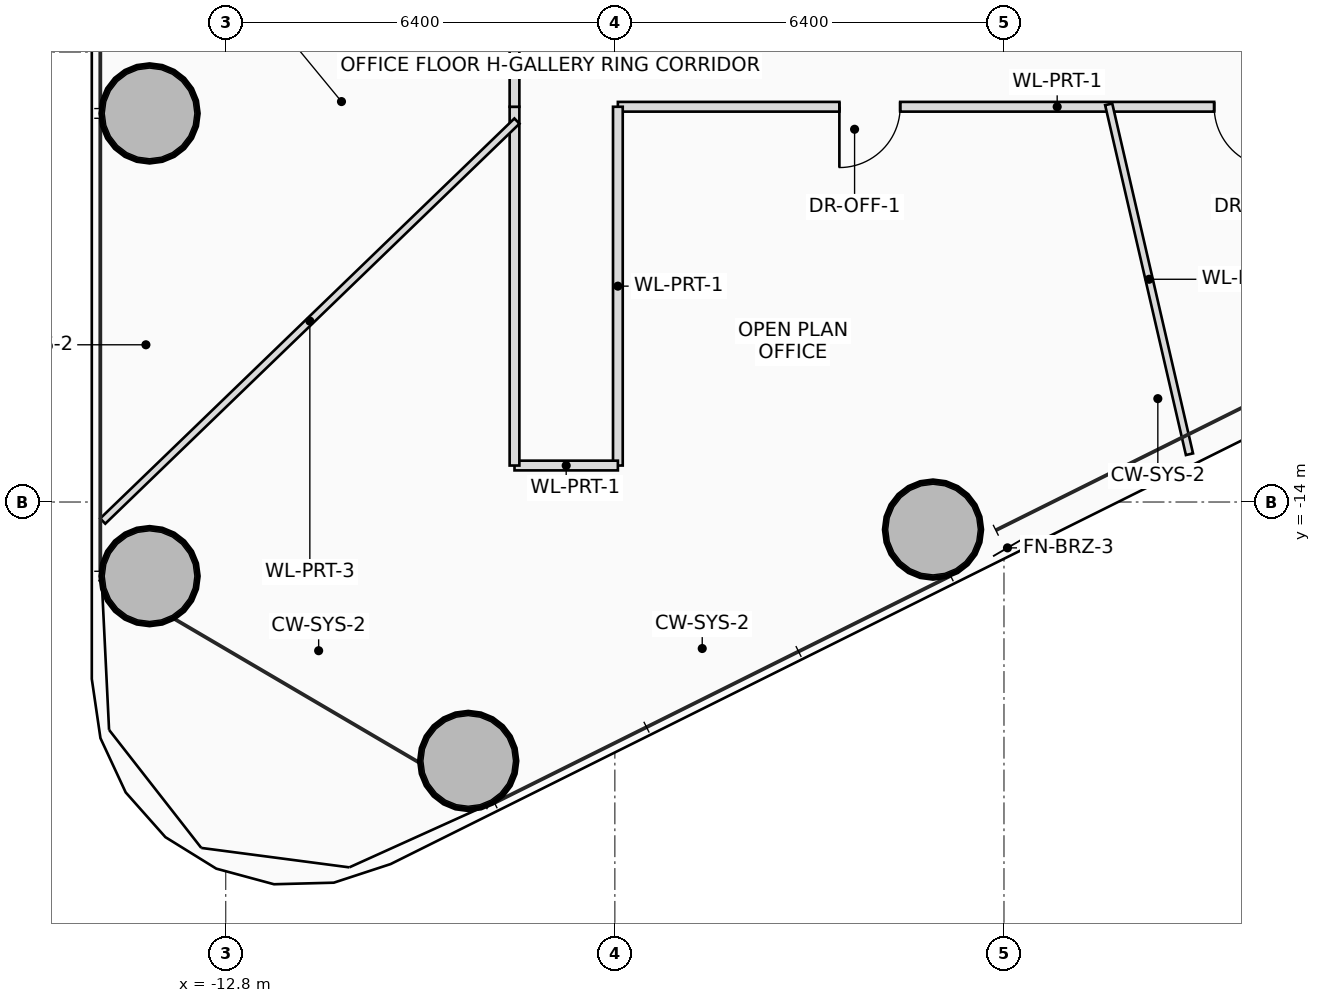
"""IFC4 building model, lengths in metres.
Left out: names, types, materials, properties, quantities, classifications, styles, units other than length and angle.
Written with IfcOpenShell. Run it as: python <this file> out.ifc"""

import sys

from ifc_helpers import new_model, si_unit, direction, frame, frame_2d, origin, origin_2d, place, context, subcontext, project, spatial, rectangle, hollow_circle, extrude, source, transform, mapped, element, fill, save


model = new_model("IFC4")
c1 = context("Model", 3, precision=1e-05, world=origin(), true_north=direction((0.0, 1.0)))
c2 = subcontext(c1, "Body", "Model", "MODEL_VIEW")
j1 = project(units=[si_unit("LENGTHUNIT", "METRE"), si_unit("PLANEANGLEUNIT", "RADIAN")], contexts=[c1])
p1 = place(None, origin())
s1 = spatial("IfcSite", under=j1, at=p1, CompositionType="ELEMENT")
p2 = place(p1, origin())
s2 = spatial("IfcBuilding", under=s1, at=p2, CompositionType="ELEMENT")
p3 = place(p2, frame((0.0, 0.0, 23.8)))
s3 = spatial("IfcBuildingStorey", under=s2, at=p3, CompositionType="ELEMENT", Elevation=23.8)
m1 = source(origin(), c2, "Body", "SweptSolid", [
    extrude(hollow_circle(Radius=0.8, WallThickness=0.055, at=origin_2d()), origin(), (0.0, 0.0, 1.0), 3.7),
])
for number, where, z_axis, x_axis in (
    (1, (-8.812, -18.258, 0.0), (0.0, 0.0, 1.0), (1.0, 0.0, 0.0)),
    (2, (-1.167, -14.453, 0.0), (0.0, 0.0, 1.0), (1.0, 0.0, 0.0)),
    (3, (-14.052, -7.61, 0.0), (0.0, 0.0, 1.0), (1.0, 0.0, 0.0)),
    (4, (-14.052, -15.219, 0.0), (0.0, 0.0, 1.0), (1.0, 0.0, 0.0)),
):
    element("IfcColumn", number, at=place(p3, frame(where, z_axis=z_axis, x_axis=x_axis)), inside=s3, PredefinedType="COLUMN", context=c2, shape_type="MappedRepresentation", body=[
        mapped(m1, transform((0.0, 0.0, 0.0), scale=1.0)),
    ])
p4 = place(p3, frame((6.35, -7.5, 0.0), z_axis=(0.0, 0.0, 1.0), x_axis=(-1.0, 0.0, 0.0)))
e5 = element("IfcWall", 5, at=p4, inside=s3, PredefinedType="PARTITIONING", context=c2, shape_type="SweptSolid", body=[
    extrude(rectangle(XDim=12.7, YDim=0.16, at=frame_2d((6.35, 0.0))), origin(), (0.0, 0.0, 1.0), 2.8),
])
p5 = place(p4, frame((1.893, 0.0, 0.0)))
e6 = element("IfcOpeningElement", 6, at=p5, cuts=e5, PredefinedType="OPENING", context=c2, shape_type="SweptSolid", body=[
    extrude(rectangle(XDim=1.0, YDim=2.25, at=frame_2d((0.5, 1.125))), frame((0.0, 0.09, 0.0), z_axis=(0.0, -1.0, 0.0), x_axis=(1.0, 0.0, 0.0)), (0.0, 0.0, 1.0), 0.18),
])
p6 = place(p4, frame((8.057, 0.0, 0.0)))
e7 = element("IfcOpeningElement", 7, at=p6, cuts=e5, PredefinedType="OPENING", context=c2, shape_type="SweptSolid", body=[
    extrude(rectangle(XDim=1.0, YDim=2.25, at=frame_2d((0.5, 1.125))), frame((0.0, 0.09, 0.0), z_axis=(0.0, -1.0, 0.0), x_axis=(1.0, 0.0, 0.0)), (0.0, 0.0, 1.0), 0.18),
])
p7 = place(p3, frame((-6.35, -7.5, 0.0), z_axis=(0.0, 0.0, 1.0), x_axis=(0.0, -1.0, 0.0)))
e8 = element("IfcWall", 8, at=p7, inside=s3, PredefinedType="PARTITIONING", context=c2, shape_type="SweptSolid", body=[
    extrude(rectangle(XDim=5.9, YDim=0.16, at=frame_2d((2.95, 0.0))), origin(), (0.0, 0.0, 1.0), 2.8),
])
p8 = place(p3, frame((-6.35, -13.4, 0.0), z_axis=(0.0, 0.0, 1.0), x_axis=(-1.0, 0.0, 0.0)))
e9 = element("IfcWall", 9, at=p8, inside=s3, PredefinedType="PARTITIONING", context=c2, shape_type="SweptSolid", body=[
    extrude(rectangle(XDim=1.7, YDim=0.16, at=frame_2d((0.85, 0.0))), origin(), (0.0, 0.0, 1.0), 2.8),
])
p9 = place(p3, frame((-8.05, -13.4, 0.0), z_axis=(0.0, 0.0, 1.0), x_axis=(0.0, 1.0, 0.0)))
e10 = element("IfcWall", 10, at=p9, inside=s3, PredefinedType="PARTITIONING", context=c2, shape_type="SweptSolid", body=[
    extrude(rectangle(XDim=5.9, YDim=0.16, at=frame_2d((2.95, 0.0))), origin(), (0.0, 0.0, 1.0), 2.8),
])
p10 = place(p3, frame((-8.05, -7.5, 0.0), z_axis=(0.0, 0.0, 1.0), x_axis=(0.0, 1.0, 0.0)))
e11 = element("IfcWall", 11, at=p10, inside=s3, PredefinedType="PARTITIONING", context=c2, shape_type="SweptSolid", body=[
    extrude(rectangle(XDim=15.0, YDim=0.16, at=frame_2d((7.5, 0.0))), origin(), (0.0, 0.0, 1.0), 2.8),
])
p11 = place(p10, frame((7.0, 0.0, 0.0)))
e12 = element("IfcOpeningElement", 12, at=p11, cuts=e11, PredefinedType="OPENING", context=c2, shape_type="SweptSolid", body=[
    extrude(rectangle(XDim=1.0, YDim=2.25, at=frame_2d((0.5, 1.125))), frame((0.0, 0.09, 0.0), z_axis=(0.0, -1.0, 0.0), x_axis=(1.0, 0.0, 0.0)), (0.0, 0.0, 1.0), 0.18),
])
p12 = place(p3, frame((-8.01, -7.735, 0.0), z_axis=(0.0, 0.0, 1.0), x_axis=(-0.719335268178, -0.694663063618, 0.0)))
e13 = element("IfcWall", 13, at=p12, inside=s3, PredefinedType="PARTITIONING", context=c2, shape_type="SweptSolid", body=[
    extrude(rectangle(XDim=9.47, YDim=0.12, at=frame_2d((4.735, 0.0))), origin(), (0.0, 0.0, 1.0), 2.8),
])
p13 = place(p3, frame((1.722, -7.46, 0.0), z_axis=(0.0, 0.0, 1.0), x_axis=(0.22494706926, -0.974370984806, 0.0)))
e14 = element("IfcWall", 14, at=p13, inside=s3, PredefinedType="PARTITIONING", context=c2, shape_type="SweptSolid", body=[
    extrude(rectangle(XDim=5.905, YDim=0.12, at=frame_2d((2.953, 0.0))), origin(), (0.0, 0.0, 1.0), 2.96),
])
p14 = place(p5, origin())
e15 = element("IfcDoor", 15, at=p14, inside=s3, OperationType="SINGLE_SWING_LEFT", PredefinedType="DOOR", context=c2, shape_type="SweptSolid", body=[
    extrude(rectangle(XDim=1.0, YDim=2.25, at=frame_2d((0.5, 1.125))), frame((0.0, 0.025, 0.0), z_axis=(0.0, -1.0, 0.0), x_axis=(1.0, 0.0, 0.0)), (0.0, 0.0, 1.0), 0.05),
])
fill(e6, e15)
p15 = place(p6, origin())
e16 = element("IfcDoor", 16, at=p15, inside=s3, OperationType="SINGLE_SWING_RIGHT", PredefinedType="DOOR", context=c2, shape_type="SweptSolid", body=[
    extrude(rectangle(XDim=1.0, YDim=2.25, at=frame_2d((0.5, 1.125))), frame((0.0, 0.025, 0.0), z_axis=(0.0, -1.0, 0.0), x_axis=(1.0, 0.0, 0.0)), (0.0, 0.0, 1.0), 0.05),
])
fill(e7, e16)
save(model, sys.argv[1])
